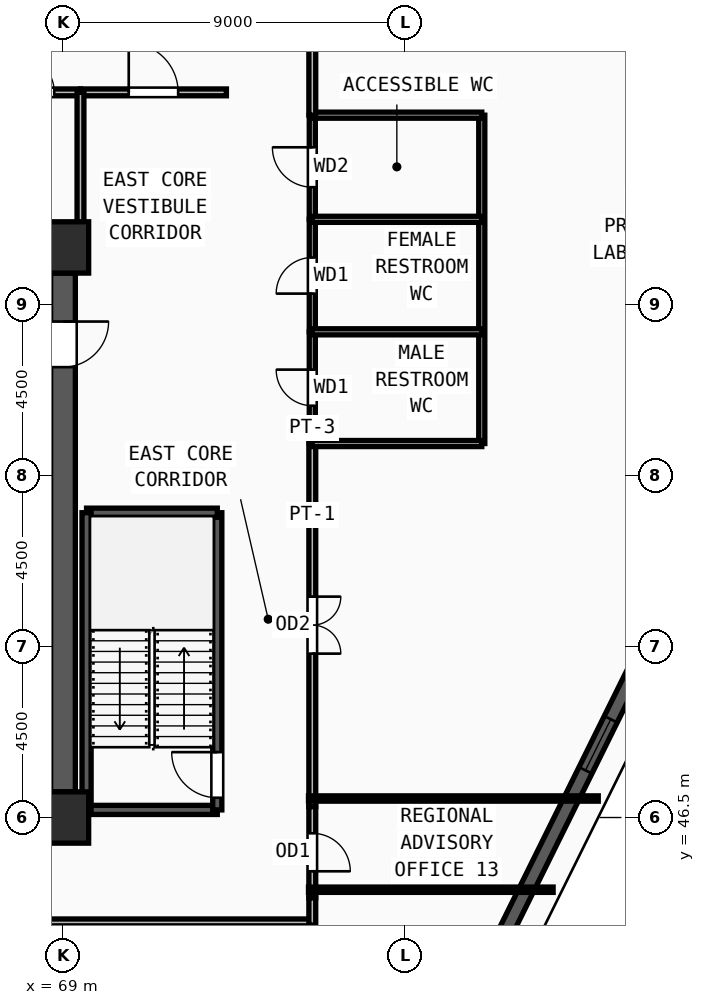
"""IFC4 building model, lengths in metres.
Left out: names, types, materials, properties, quantities, classifications, styles, units other than length and angle.
Written with IfcOpenShell. Run it as: python <this file> out.ifc"""

import sys

from ifc_helpers import new_model, si_unit, direction, frame, frame_2d, origin, origin_2d, place, context, subcontext, project, spatial, rectangle, extrude, source, transform, mapped, element, fill, save


model = new_model("IFC4")
c1 = context("Model", 3, precision=1e-05, world=origin(), true_north=direction((0.0, 1.0)))
c2 = subcontext(c1, "Body", "Model", "MODEL_VIEW")
j1 = project(units=[si_unit("LENGTHUNIT", "METRE"), si_unit("PLANEANGLEUNIT", "RADIAN")], contexts=[c1])
p1 = place(None, origin())
s1 = spatial("IfcSite", under=j1, at=p1, CompositionType="ELEMENT")
p2 = place(p1, origin())
s2 = spatial("IfcBuilding", under=s1, at=p2, CompositionType="ELEMENT")
p3 = place(p2, frame((0.0, 0.0, 247.5)))
s3 = spatial("IfcBuildingStorey", under=s2, at=p3, CompositionType="ELEMENT", Elevation=247.5)
m1 = source(origin(), c2, "Body", "SweptSolid", [
    extrude(rectangle(XDim=1.35, YDim=1.35, at=origin_2d()), origin(), (0.0, 0.0, 1.0), 3.75),
])
for number, where, z_axis, x_axis in (
    (1, (69.0, 46.5, 0.0), (0.0, 0.0, 1.0), (1.0, 0.0, 0.0)),
    (2, (69.0, 61.5, 0.0), (0.0, 0.0, 1.0), (1.0, 0.0, 0.0)),
):
    element("IfcColumn", number, at=place(p3, frame(where, z_axis=z_axis, x_axis=x_axis)), inside=s3, PredefinedType="COLUMN", context=c2, shape_type="MappedRepresentation", body=[
        mapped(m1, transform((0.0, 0.0, 0.0), x_axis=(1.0, 0.0, 0.0), y_axis=(0.0, 1.0, 0.0), z_axis=(0.0, 0.0, 1.0), scale=1.0)),
    ])
p4 = place(p3, frame((79.281, 40.733, 0.0), z_axis=(0.0, 0.0, 1.0), x_axis=(0.44350165784, 0.896273551709, 0.0)))
e3 = element("IfcWall", 3, at=p4, inside=s3, PredefinedType="SOLIDWALL", context=c2, shape_type="SweptSolid", body=[
    extrude(rectangle(XDim=28.074, YDim=0.38, at=frame_2d((14.037, 0.0))), origin(), (0.0, 0.0, 1.0), 3.57),
])
m2 = source(origin(), c2, "Body", "SweptSolid", [
    extrude(rectangle(XDim=1.5, YDim=1.9, at=frame_2d((0.75, 0.95))), frame((0.0, 0.2, 0.0), z_axis=(0.0, -1.0, 0.0), x_axis=(1.0, 0.0, 0.0)), (0.0, 0.0, 1.0), 0.4),
])
p5 = place(p4, frame((7.819, 0.0, 0.55)))
e4 = element("IfcOpeningElement", 4, at=p5, cuts=e3, PredefinedType="OPENING", context=c2, shape_type="MappedRepresentation", body=[
    mapped(m2, transform((0.0, 0.0, 0.0), x_axis=(1.0, 0.0, 0.0), y_axis=(0.0, 1.0, 0.0), z_axis=(0.0, 0.0, 1.0), scale=1.0)),
])
p6 = place(p4, frame((13.287, 0.0, 0.55)))
e5 = element("IfcOpeningElement", 5, at=p6, cuts=e3, PredefinedType="OPENING", context=c2, shape_type="MappedRepresentation", body=[
    mapped(m2, transform((0.0, 0.0, 0.0), x_axis=(1.0, 0.0, 0.0), y_axis=(0.0, 1.0, 0.0), z_axis=(0.0, 0.0, 1.0), scale=1.0)),
])
p7 = place(p4, frame((20.306, 0.0, 0.55)))
e6 = element("IfcOpeningElement", 6, at=p7, cuts=e3, PredefinedType="OPENING", context=c2, shape_type="MappedRepresentation", body=[
    mapped(m2, transform((0.0, 0.0, 0.0), x_axis=(1.0, 0.0, 0.0), y_axis=(0.0, 1.0, 0.0), z_axis=(0.0, 0.0, 1.0), scale=1.0)),
])
p8 = place(p3, frame((69.0, 60.825, 0.0), z_axis=(0.0, 0.0, 1.0), x_axis=(0.0, -1.0, 0.0)))
e7 = element("IfcWall", 7, at=p8, inside=s3, PredefinedType="SHEAR", context=c2, shape_type="SweptSolid", body=[
    extrude(rectangle(XDim=13.65, YDim=0.65, at=frame_2d((6.825, 0.0))), origin(), (0.0, 0.0, 1.0), 3.57),
])
m3 = source(origin(), c2, "Body", "SweptSolid", [
    extrude(rectangle(XDim=1.2, YDim=2.2, at=frame_2d((0.6, 1.1))), frame((0.0, 0.335, 0.0), z_axis=(0.0, -1.0, 0.0), x_axis=(1.0, 0.0, 0.0)), (0.0, 0.0, 1.0), 0.67),
])
p9 = place(p8, frame((1.275, 0.0, 0.0)))
e8 = element("IfcOpeningElement", 8, at=p9, cuts=e7, PredefinedType="OPENING", context=c2, shape_type="MappedRepresentation", body=[
    mapped(m3, transform((0.0, 0.0, 0.0), x_axis=(1.0, 0.0, 0.0), y_axis=(0.0, 1.0, 0.0), z_axis=(0.0, 0.0, 1.0), scale=1.0)),
])
p10 = place(p3, frame((69.62, 46.7, 0.0), z_axis=(0.0, 0.0, 1.0), x_axis=(1.0, 0.0, 0.0)))
e9 = element("IfcWall", 9, at=p10, inside=s3, PredefinedType="SOLIDWALL", context=c2, shape_type="SweptSolid", body=[
    extrude(rectangle(XDim=3.44, YDim=0.24, at=frame_2d((1.72, 0.0))), origin(), (0.0, 0.0, 1.0), 3.57),
])
p11 = place(p3, frame((73.06, 46.7, 0.0), z_axis=(0.0, 0.0, 1.0), x_axis=(0.0, 1.0, 0.0)))
e10 = element("IfcWall", 10, at=p11, inside=s3, PredefinedType="SOLIDWALL", context=c2, shape_type="SweptSolid", body=[
    extrude(rectangle(XDim=7.82, YDim=0.24, at=frame_2d((3.91, 0.0))), origin(), (0.0, 0.0, 1.0), 3.57),
])
m4 = source(origin(), c2, "Body", "SweptSolid", [
    extrude(rectangle(XDim=1.2, YDim=2.2, at=frame_2d((0.6, 1.1))), frame((0.0, 0.13, 0.0), z_axis=(0.0, -1.0, 0.0), x_axis=(1.0, 0.0, 0.0)), (0.0, 0.0, 1.0), 0.26),
])
p12 = place(p11, frame((0.32, 0.0, 0.0)))
e11 = element("IfcOpeningElement", 11, at=p12, cuts=e10, PredefinedType="OPENING", context=c2, shape_type="MappedRepresentation", body=[
    mapped(m4, transform((0.0, 0.0, 0.0), x_axis=(1.0, 0.0, 0.0), y_axis=(0.0, 1.0, 0.0), z_axis=(0.0, 0.0, 1.0), scale=1.0)),
])
p13 = place(p3, frame((73.06, 54.52, 0.0), z_axis=(0.0, 0.0, 1.0), x_axis=(-1.0, 0.0, 0.0)))
e12 = element("IfcWall", 12, at=p13, inside=s3, PredefinedType="SOLIDWALL", context=c2, shape_type="SweptSolid", body=[
    extrude(rectangle(XDim=3.44, YDim=0.24, at=frame_2d((1.72, 0.0))), origin(), (0.0, 0.0, 1.0), 3.57),
])
p14 = place(p3, frame((69.62, 54.52, 0.0), z_axis=(0.0, 0.0, 1.0), x_axis=(0.0, -1.0, 0.0)))
e13 = element("IfcWall", 13, at=p14, inside=s3, PredefinedType="SOLIDWALL", context=c2, shape_type="SweptSolid", body=[
    extrude(rectangle(XDim=7.82, YDim=0.24, at=frame_2d((3.91, 0.0))), origin(), (0.0, 0.0, 1.0), 3.57),
])
p15 = place(p3, frame((75.56, 56.34, 0.0), z_axis=(0.0, 0.0, 1.0), x_axis=(0.0, 1.0, 0.0)))
e14 = element("IfcWall", 14, at=p15, inside=s3, PredefinedType="PARTITIONING", context=c2, shape_type="SweptSolid", body=[
    extrude(rectangle(XDim=2.94, YDim=0.16, at=frame_2d((1.47, 0.0))), origin(), (0.0, 0.0, 1.0), 3.57),
])
m5 = source(origin(), c2, "Body", "SweptSolid", [
    extrude(rectangle(XDim=0.95, YDim=2.15, at=frame_2d((0.475, 1.075))), frame((0.0, 0.09, 0.0), z_axis=(0.0, -1.0, 0.0), x_axis=(1.0, 0.0, 0.0)), (0.0, 0.0, 1.0), 0.18),
])
p16 = place(p15, frame((0.995, 0.0, 0.0)))
e15 = element("IfcOpeningElement", 15, at=p16, cuts=e14, PredefinedType="OPENING", context=c2, shape_type="MappedRepresentation", body=[
    mapped(m5, transform((0.0, 0.0, 0.0), x_axis=(1.0, 0.0, 0.0), y_axis=(0.0, 1.0, 0.0), z_axis=(0.0, 0.0, 1.0), scale=1.0)),
])
p17 = place(p3, frame((75.56, 59.28, 0.0), z_axis=(0.0, 0.0, 1.0), x_axis=(0.0, 1.0, 0.0)))
e16 = element("IfcWall", 16, at=p17, inside=s3, PredefinedType="PARTITIONING", context=c2, shape_type="SweptSolid", body=[
    extrude(rectangle(XDim=2.96, YDim=0.16, at=frame_2d((1.48, 0.0))), origin(), (0.0, 0.0, 1.0), 3.57),
])
p18 = place(p17, frame((1.005, 0.0, 0.0)))
e17 = element("IfcOpeningElement", 17, at=p18, cuts=e16, PredefinedType="OPENING", context=c2, shape_type="MappedRepresentation", body=[
    mapped(m5, transform((0.0, 0.0, 0.0), x_axis=(1.0, 0.0, 0.0), y_axis=(0.0, 1.0, 0.0), z_axis=(0.0, 0.0, 1.0), scale=1.0)),
])
p19 = place(p3, frame((75.56, 62.24, 0.0), z_axis=(0.0, 0.0, 1.0), x_axis=(0.0, 1.0, 0.0)))
e18 = element("IfcWall", 18, at=p19, inside=s3, PredefinedType="PARTITIONING", context=c2, shape_type="SweptSolid", body=[
    extrude(rectangle(XDim=2.74, YDim=0.16, at=frame_2d((1.37, 0.0))), origin(), (0.0, 0.0, 1.0), 3.57),
])
m6 = source(origin(), c2, "Body", "SweptSolid", [
    extrude(rectangle(XDim=1.05, YDim=2.15, at=frame_2d((0.525, 1.075))), frame((0.0, 0.09, 0.0), z_axis=(0.0, -1.0, 0.0), x_axis=(1.0, 0.0, 0.0)), (0.0, 0.0, 1.0), 0.18),
])
p20 = place(p19, frame((0.845, 0.0, 0.0)))
e19 = element("IfcOpeningElement", 19, at=p20, cuts=e18, PredefinedType="OPENING", context=c2, shape_type="MappedRepresentation", body=[
    mapped(m6, transform((0.0, 0.0, 0.0), x_axis=(1.0, 0.0, 0.0), y_axis=(0.0, 1.0, 0.0), z_axis=(0.0, 0.0, 1.0), scale=1.0)),
])
p21 = place(p3, frame((67.08, 65.58, 0.0), z_axis=(0.0, 0.0, 1.0), x_axis=(1.0, 0.0, 0.0)))
e20 = element("IfcWall", 20, at=p21, inside=s3, PredefinedType="PARTITIONING", context=c2, shape_type="SweptSolid", body=[
    extrude(rectangle(XDim=2.38, YDim=0.18, at=frame_2d((1.19, 0.0))), origin(), (0.0, 0.0, 1.0), 3.57),
])
m7 = source(origin(), c2, "Body", "SweptSolid", [
    extrude(rectangle(XDim=1.0, YDim=2.2, at=frame_2d((0.5, 1.1))), frame((0.0, 0.1, 0.0), z_axis=(0.0, -1.0, 0.0), x_axis=(1.0, 0.0, 0.0)), (0.0, 0.0, 1.0), 0.2),
])
p22 = place(p21, frame((0.69, 0.0, 0.0)))
e21 = element("IfcOpeningElement", 21, at=p22, cuts=e20, PredefinedType="OPENING", context=c2, shape_type="MappedRepresentation", body=[
    mapped(m7, transform((0.0, 0.0, 0.0), x_axis=(1.0, 0.0, 0.0), y_axis=(0.0, 1.0, 0.0), z_axis=(0.0, 0.0, 1.0), scale=1.0)),
])
p23 = place(p3, frame((69.46, 65.58, 0.0), z_axis=(0.0, 0.0, 1.0), x_axis=(1.0, 0.0, 0.0)))
e22 = element("IfcWall", 22, at=p23, inside=s3, PredefinedType="PARTITIONING", context=c2, shape_type="SweptSolid", body=[
    extrude(rectangle(XDim=3.84, YDim=0.18, at=frame_2d((1.92, 0.0))), origin(), (0.0, 0.0, 1.0), 3.57),
])
m8 = source(origin(), c2, "Body", "SweptSolid", [
    extrude(rectangle(XDim=1.3, YDim=2.2, at=frame_2d((0.65, 1.1))), frame((0.0, 0.1, 0.0), z_axis=(0.0, -1.0, 0.0), x_axis=(1.0, 0.0, 0.0)), (0.0, 0.0, 1.0), 0.2),
])
p24 = place(p23, frame((1.27, 0.0, 0.0)))
e23 = element("IfcOpeningElement", 23, at=p24, cuts=e22, PredefinedType="OPENING", context=c2, shape_type="MappedRepresentation", body=[
    mapped(m8, transform((0.0, 0.0, 0.0), x_axis=(1.0, 0.0, 0.0), y_axis=(0.0, 1.0, 0.0), z_axis=(0.0, 0.0, 1.0), scale=1.0)),
])
p25 = place(p3, frame((75.56, 56.34, 0.0), z_axis=(0.0, 0.0, 1.0), x_axis=(0.0, -1.0, 0.0)))
e24 = element("IfcWall", 24, at=p25, inside=s3, PredefinedType="PARTITIONING", context=c2, shape_type="SweptSolid", body=[
    extrude(rectangle(XDim=9.555, YDim=0.18, at=frame_2d((4.778, 0.0))), origin(), (0.0, 0.0, 1.0), 3.57),
])
m9 = source(origin(), c2, "Body", "SweptSolid", [
    extrude(rectangle(XDim=1.5, YDim=2.2, at=frame_2d((0.75, 1.1))), frame((0.0, 0.1, 0.0), z_axis=(0.0, -1.0, 0.0), x_axis=(1.0, 0.0, 0.0)), (0.0, 0.0, 1.0), 0.2),
])
p26 = place(p25, frame((4.028, 0.0, 0.0)))
e25 = element("IfcOpeningElement", 25, at=p26, cuts=e24, PredefinedType="OPENING", context=c2, shape_type="MappedRepresentation", body=[
    mapped(m9, transform((0.0, 0.0, 0.0), x_axis=(1.0, 0.0, 0.0), y_axis=(0.0, 1.0, 0.0), z_axis=(0.0, 0.0, 1.0), scale=1.0)),
])
p27 = place(p3, frame((75.63, 43.74, 0.0), z_axis=(0.0, 0.0, 1.0), x_axis=(-1.0, 0.0, 0.0)))
e26 = element("IfcWall", 26, at=p27, inside=s3, PredefinedType="PARTITIONING", context=c2, shape_type="SweptSolid", body=[
    extrude(rectangle(XDim=20.915, YDim=0.18, at=frame_2d((10.458, 0.0))), origin(), (0.0, 0.0, 1.0), 3.57),
])
p28 = place(p27, frame((9.707, 0.0, 0.0)))
e27 = element("IfcOpeningElement", 27, at=p28, cuts=e26, PredefinedType="OPENING", context=c2, shape_type="MappedRepresentation", body=[
    mapped(m9, transform((0.0, 0.0, 0.0), x_axis=(1.0, 0.0, 0.0), y_axis=(0.0, 1.0, 0.0), z_axis=(0.0, 0.0, 1.0), scale=1.0)),
])
p29 = place(p3, frame((75.56, 46.785, 0.0), z_axis=(0.0, 0.0, 1.0), x_axis=(0.0, -1.0, 0.0)))
e28 = element("IfcWall", 28, at=p29, inside=s3, PredefinedType="PARTITIONING", context=c2, shape_type="SweptSolid", body=[
    extrude(rectangle(XDim=2.4, YDim=0.18, at=frame_2d((1.2, 0.0))), origin(), (0.0, 0.0, 1.0), 3.57),
])
p30 = place(p29, frame((0.7, 0.0, 0.0)))
e29 = element("IfcOpeningElement", 29, at=p30, cuts=e28, PredefinedType="OPENING", context=c2, shape_type="MappedRepresentation", body=[
    mapped(m7, transform((0.0, 0.0, 0.0), x_axis=(1.0, 0.0, 0.0), y_axis=(0.0, 1.0, 0.0), z_axis=(0.0, 0.0, 1.0), scale=1.0)),
])
p31 = place(p3, frame((80.02, 56.34, 0.0), z_axis=(0.0, 0.0, 1.0), x_axis=(0.0, 1.0, 0.0)))
e30 = element("IfcWall", 30, at=p31, inside=s3, PredefinedType="PARTITIONING", context=c2, shape_type="SweptSolid", body=[
    extrude(rectangle(XDim=8.64, YDim=0.16, at=frame_2d((4.32, 0.0))), origin(), (0.0, 0.0, 1.0), 3.57),
])
for number, where, z_axis, x_axis in (
    (31, (75.56, 56.34, 0.0), (0.0, 0.0, 1.0), (1.0, 0.0, 0.0)),
    (32, (75.56, 59.28, 0.0), (0.0, 0.0, 1.0), (1.0, 0.0, 0.0)),
    (33, (75.56, 62.24, 0.0), (0.0, 0.0, 1.0), (1.0, 0.0, 0.0)),
    (34, (75.56, 64.98, 0.0), (0.0, 0.0, 1.0), (1.0, 0.0, 0.0)),
):
    element("IfcWall", number, at=place(p3, frame(where, z_axis=z_axis, x_axis=x_axis)), inside=s3, PredefinedType="PARTITIONING", context=c2, shape_type="SweptSolid", body=[
        extrude(rectangle(XDim=4.46, YDim=0.16, at=frame_2d((2.23, 0.0))), origin(), (0.0, 0.0, 1.0), 3.57),
    ])
p32 = place(p3, frame((69.46, 61.95, 0.0), z_axis=(0.0, 0.0, 1.0), x_axis=(0.0, 1.0, 0.0)))
e35 = element("IfcWall", 35, at=p32, inside=s3, PredefinedType="PARTITIONING", context=c2, shape_type="SweptSolid", body=[
    extrude(rectangle(XDim=3.63, YDim=0.18, at=frame_2d((1.815, 0.0))), origin(), (0.0, 0.0, 1.0), 3.57),
])
p33 = place(p3, frame((75.56, 67.215, 0.0), z_axis=(0.0, 0.0, 1.0), x_axis=(0.0, -1.0, 0.0)))
e36 = element("IfcWall", 36, at=p33, inside=s3, PredefinedType="PARTITIONING", context=c2, shape_type="SweptSolid", body=[
    extrude(rectangle(XDim=2.235, YDim=0.18, at=frame_2d((1.118, 0.0))), origin(), (0.0, 0.0, 1.0), 3.57),
])
p34 = place(p3, frame((75.56, 44.385, 0.0), z_axis=(0.0, 0.0, 1.0), x_axis=(0.0, -1.0, 0.0)))
e37 = element("IfcWall", 37, at=p34, inside=s3, PredefinedType="PARTITIONING", context=c2, shape_type="SweptSolid", body=[
    extrude(rectangle(XDim=0.715, YDim=0.18, at=frame_2d((0.357, 0.0))), origin(), (0.0, 0.0, 1.0), 3.57),
])
p35 = place(p3, frame((75.46, 44.6, 0.0), z_axis=(0.0, 0.0, 1.0), x_axis=(1.0, 0.0, 0.0)))
e38 = element("IfcWall", 38, at=p35, inside=s3, PredefinedType="PARTITIONING", context=c2, shape_type="SweptSolid", body=[
    extrude(rectangle(XDim=6.437, YDim=0.14, at=frame_2d((3.219, 0.0))), origin(), (0.0, 0.0, 1.0), 3.57),
])
p36 = place(p3, frame((75.46, 47.0, 0.0), z_axis=(0.0, 0.0, 1.0), x_axis=(1.0, 0.0, 0.0)))
e39 = element("IfcWall", 39, at=p36, inside=s3, PredefinedType="PARTITIONING", context=c2, shape_type="SweptSolid", body=[
    extrude(rectangle(XDim=7.625, YDim=0.14, at=frame_2d((3.812, 0.0))), origin(), (0.0, 0.0, 1.0), 3.57),
])
m10 = source(origin(), c2, "Body", "SweptSolid", [
    extrude(rectangle(XDim=1.5, YDim=1.9, at=frame_2d((0.75, 0.95))), frame((0.0, 0.03, 0.0), z_axis=(0.0, -1.0, 0.0), x_axis=(1.0, 0.0, 0.0)), (0.0, 0.0, 1.0), 0.06),
])
p37 = place(p5, origin())
e40 = element("IfcWindow", 40, at=p37, inside=s3, PartitioningType="DOUBLE_PANEL_VERTICAL", PredefinedType="WINDOW", context=c2, shape_type="MappedRepresentation", body=[
    mapped(m10, transform((0.0, 0.0, 0.0), x_axis=(1.0, 0.0, 0.0), y_axis=(0.0, 1.0, 0.0), z_axis=(0.0, 0.0, 1.0), scale=1.0)),
])
fill(e4, e40)
m11 = source(origin(), c2, "Body", "SweptSolid", [
    extrude(rectangle(XDim=1.2, YDim=2.2, at=frame_2d((0.6, 1.1))), frame((0.0, 0.025, 0.0), z_axis=(0.0, -1.0, 0.0), x_axis=(1.0, 0.0, 0.0)), (0.0, 0.0, 1.0), 0.05),
])
p38 = place(p9, origin())
e41 = element("IfcDoor", 41, at=p38, inside=s3, OperationType="SINGLE_SWING_LEFT", PredefinedType="DOOR", context=c2, shape_type="MappedRepresentation", body=[
    mapped(m11, transform((0.0, 0.0, 0.0), x_axis=(1.0, 0.0, 0.0), y_axis=(0.0, 1.0, 0.0), z_axis=(0.0, 0.0, 1.0), scale=1.0)),
])
fill(e8, e41)
p39 = place(p12, origin())
e42 = element("IfcDoor", 42, at=p39, inside=s3, OperationType="SINGLE_SWING_RIGHT", PredefinedType="DOOR", context=c2, shape_type="MappedRepresentation", body=[
    mapped(m11, transform((0.0, 0.0, 0.0), x_axis=(1.0, 0.0, 0.0), y_axis=(0.0, 1.0, 0.0), z_axis=(0.0, 0.0, 1.0), scale=1.0)),
])
fill(e11, e42)
m12 = source(origin(), c2, "Body", "SweptSolid", [
    extrude(rectangle(XDim=0.95, YDim=2.15, at=frame_2d((0.475, 1.075))), frame((0.0, 0.025, 0.0), z_axis=(0.0, -1.0, 0.0), x_axis=(1.0, 0.0, 0.0)), (0.0, 0.0, 1.0), 0.05),
])
p40 = place(p16, origin())
e43 = element("IfcDoor", 43, at=p40, inside=s3, OperationType="SINGLE_SWING_RIGHT", PredefinedType="DOOR", context=c2, shape_type="MappedRepresentation", body=[
    mapped(m12, transform((0.0, 0.0, 0.0), x_axis=(1.0, 0.0, 0.0), y_axis=(0.0, 1.0, 0.0), z_axis=(0.0, 0.0, 1.0), scale=1.0)),
])
fill(e15, e43)
p41 = place(p18, origin())
e44 = element("IfcDoor", 44, at=p41, inside=s3, OperationType="SINGLE_SWING_LEFT", PredefinedType="DOOR", context=c2, shape_type="MappedRepresentation", body=[
    mapped(m12, transform((0.0, 0.0, 0.0), x_axis=(1.0, 0.0, 0.0), y_axis=(0.0, 1.0, 0.0), z_axis=(0.0, 0.0, 1.0), scale=1.0)),
])
fill(e17, e44)
m13 = source(origin(), c2, "Body", "SweptSolid", [
    extrude(rectangle(XDim=1.05, YDim=2.15, at=frame_2d((0.525, 1.075))), frame((0.0, 0.025, 0.0), z_axis=(0.0, -1.0, 0.0), x_axis=(1.0, 0.0, 0.0)), (0.0, 0.0, 1.0), 0.05),
])
p42 = place(p20, origin())
e45 = element("IfcDoor", 45, at=p42, inside=s3, OperationType="SINGLE_SWING_RIGHT", PredefinedType="DOOR", context=c2, shape_type="MappedRepresentation", body=[
    mapped(m13, transform((0.0, 0.0, 0.0), x_axis=(1.0, 0.0, 0.0), y_axis=(0.0, 1.0, 0.0), z_axis=(0.0, 0.0, 1.0), scale=1.0)),
])
fill(e19, e45)
m14 = source(origin(), c2, "Body", "SweptSolid", [
    extrude(rectangle(XDim=1.0, YDim=2.2, at=frame_2d((0.5, 1.1))), frame((0.0, 0.025, 0.0), z_axis=(0.0, -1.0, 0.0), x_axis=(1.0, 0.0, 0.0)), (0.0, 0.0, 1.0), 0.05),
])
p43 = place(p22, origin())
e46 = element("IfcDoor", 46, at=p43, inside=s3, OperationType="SINGLE_SWING_LEFT", PredefinedType="DOOR", context=c2, shape_type="MappedRepresentation", body=[
    mapped(m14, transform((0.0, 0.0, 0.0), x_axis=(1.0, 0.0, 0.0), y_axis=(0.0, 1.0, 0.0), z_axis=(0.0, 0.0, 1.0), scale=1.0)),
])
fill(e21, e46)
m15 = source(origin(), c2, "Body", "SweptSolid", [
    extrude(rectangle(XDim=1.3, YDim=2.2, at=frame_2d((0.65, 1.1))), frame((0.0, 0.025, 0.0), z_axis=(0.0, -1.0, 0.0), x_axis=(1.0, 0.0, 0.0)), (0.0, 0.0, 1.0), 0.05),
])
p44 = place(p24, origin())
e47 = element("IfcDoor", 47, at=p44, inside=s3, OperationType="SINGLE_SWING_LEFT", PredefinedType="DOOR", context=c2, shape_type="MappedRepresentation", body=[
    mapped(m15, transform((0.0, 0.0, 0.0), x_axis=(1.0, 0.0, 0.0), y_axis=(0.0, 1.0, 0.0), z_axis=(0.0, 0.0, 1.0), scale=1.0)),
])
fill(e23, e47)
m16 = source(origin(), c2, "Body", "SweptSolid", [
    extrude(rectangle(XDim=1.5, YDim=2.2, at=frame_2d((0.75, 1.1))), frame((0.0, 0.025, 0.0), z_axis=(0.0, -1.0, 0.0), x_axis=(1.0, 0.0, 0.0)), (0.0, 0.0, 1.0), 0.05),
])
p45 = place(p26, origin())
e48 = element("IfcDoor", 48, at=p45, inside=s3, OperationType="DOUBLE_DOOR_SINGLE_SWING", PredefinedType="DOOR", context=c2, shape_type="MappedRepresentation", body=[
    mapped(m16, transform((0.0, 0.0, 0.0), x_axis=(1.0, 0.0, 0.0), y_axis=(0.0, 1.0, 0.0), z_axis=(0.0, 0.0, 1.0), scale=1.0)),
])
fill(e25, e48)
p46 = place(p30, origin())
e49 = element("IfcDoor", 49, at=p46, inside=s3, OperationType="SINGLE_SWING_RIGHT", PredefinedType="DOOR", context=c2, shape_type="MappedRepresentation", body=[
    mapped(m14, transform((0.0, 0.0, 0.0), x_axis=(1.0, 0.0, 0.0), y_axis=(0.0, 1.0, 0.0), z_axis=(0.0, 0.0, 1.0), scale=1.0)),
])
fill(e29, e49)
save(model, sys.argv[1])
